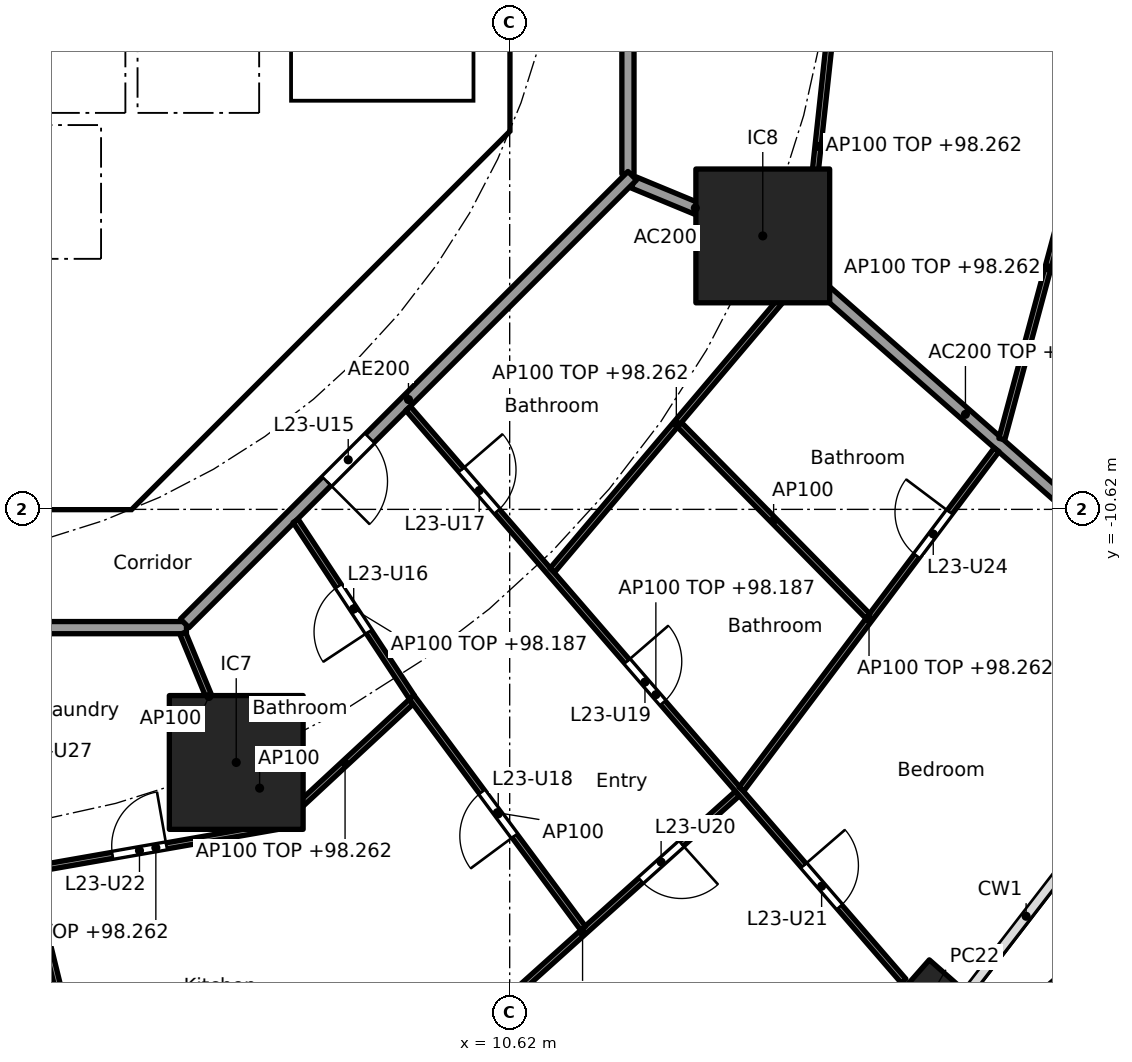
"""IFC4 building model, lengths in metres.
Left out: names, types, materials, properties, quantities, classifications, styles, units other than length and angle.
Written with IfcOpenShell. Run it as: python <this file> out.ifc"""

import sys

from ifc_helpers import new_model, si_unit, direction, frame, frame_2d, origin, origin_2d, place, context, subcontext, project, spatial, polyline, rectangle, hollow_rectangle, outline, extrude, element, fill, save


model = new_model("IFC4")
c1 = context("Model", 3, precision=1e-05, world=origin(), true_north=direction((0.0, 1.0)))
c2 = subcontext(c1, "Body", "Model", "MODEL_VIEW")
j1 = project(units=[si_unit("LENGTHUNIT", "METRE"), si_unit("PLANEANGLEUNIT", "RADIAN")], contexts=[c1])
p1 = place(None, origin())
s1 = spatial("IfcSite", under=j1, at=p1, CompositionType="ELEMENT")
p2 = place(p1, origin())
s2 = spatial("IfcBuilding", under=s1, at=p2, CompositionType="ELEMENT")
p3 = place(p2, frame((0.0, 0.0, 95.5)))
s3 = spatial("IfcBuildingStorey", under=s2, at=p3, CompositionType="ELEMENT", Elevation=95.5)
p4 = place(p3, frame((17.43, -18.813, 0.0), z_axis=(0.0, 0.0, 1.0), x_axis=(0.660114607735, 0.751164898445, 0.0)))
e1 = element("IfcColumn", 1, at=p4, inside=s3, PredefinedType="COLUMN", context=c2, shape_type="SweptSolid", body=[
    extrude(hollow_rectangle(XDim=1.3, YDim=0.9, WallThickness=0.045, at=origin_2d()), origin(), (0.0, 0.0, 1.0), 3.7),
])
for number, where, z_axis, x_axis in (
    (2, (6.123, -14.782, 0.0), (0.0, 0.0, 1.0), (1.0, 0.0, 0.0)),
    (3, (14.782, -6.123, 0.0), (0.0, 0.0, 1.0), (1.0, 0.0, 0.0)),
):
    element("IfcColumn", number, at=place(p3, frame(where, z_axis=z_axis, x_axis=x_axis)), inside=s3, PredefinedType="COLUMN", context=c2, shape_type="SweptSolid", body=[
        extrude(rectangle(XDim=2.2, YDim=2.2, at=origin_2d()), origin(), (0.0, 0.0, 1.0), 3.7),
    ])
p5 = place(p3, frame((4.613, -9.988, 0.0), z_axis=(0.0, 0.0, 1.0), x_axis=(0.707106781187, 0.707106781187, 0.0)))
e4 = element("IfcWall", 4, at=p5, inside=s3, PredefinedType="SHEAR", context=c2, shape_type="SweptSolid", body=[
    extrude(rectangle(XDim=7.602, YDim=0.6, at=frame_2d((3.801, 0.0))), origin(), (0.0, 0.0, 1.0), 3.44),
])
p6 = place(p5, frame((3.201, 0.0, 0.0)))
e5 = element("IfcOpeningElement", 5, at=p6, cuts=e4, PredefinedType="OPENING", context=c2, shape_type="SweptSolid", body=[
    extrude(rectangle(XDim=1.2, YDim=2.1, at=frame_2d((0.6, 1.05))), frame((0.0, 0.31, 0.0), z_axis=(0.0, -1.0, 0.0), x_axis=(1.0, 0.0, 0.0)), (0.0, 0.0, 1.0), 0.62),
])
p7 = place(p3, frame((4.0, -10.025, 0.0), z_axis=(0.0, 0.0, 1.0), x_axis=(0.0, 1.0, 0.0)))
e6 = element("IfcWall", 6, at=p7, inside=s3, PredefinedType="SOLIDWALL", context=c2, shape_type="SweptSolid", body=[
    extrude(rectangle(XDim=3.0, YDim=0.2, at=frame_2d((1.5, 0.0))), origin(), (0.0, 0.0, 1.0), 3.44),
])
p8 = place(p7, frame((0.975, 0.0, 0.0)))
e7 = element("IfcOpeningElement", 7, at=p8, cuts=e6, PredefinedType="OPENING", context=c2, shape_type="SweptSolid", body=[
    extrude(rectangle(XDim=1.1, YDim=2.1, at=frame_2d((0.55, 1.05))), frame((0.0, 0.11, 0.0), z_axis=(0.0, -1.0, 0.0), x_axis=(1.0, 0.0, 0.0)), (0.0, 0.0, 1.0), 0.22),
])
p9 = place(p3, frame((4.0, -6.5, 0.0), z_axis=(0.0, 0.0, 1.0), x_axis=(0.0, 1.0, 0.0)))
e8 = element("IfcWall", 8, at=p9, inside=s3, PredefinedType="SOLIDWALL", context=c2, shape_type="SweptSolid", body=[
    extrude(rectangle(XDim=2.2, YDim=0.2, at=frame_2d((1.1, 0.0))), origin(), (0.0, 0.0, 1.0), 3.44),
])
p10 = place(p9, frame((0.55, 0.0, 0.0)))
e9 = element("IfcOpeningElement", 9, at=p10, cuts=e8, PredefinedType="OPENING", context=c2, shape_type="SweptSolid", body=[
    extrude(rectangle(XDim=1.1, YDim=2.1, at=frame_2d((0.55, 1.05))), frame((0.0, 0.11, 0.0), z_axis=(0.0, -1.0, 0.0), x_axis=(1.0, 0.0, 0.0)), (0.0, 0.0, 1.0), 0.22),
])
p11 = place(p3, origin())
e10 = element("IfcWall", 10, at=p11, inside=s3, PredefinedType="SHEAR", context=c2, shape_type="SweptSolid", body=[
    extrude(outline(polyline([(-4.152, -10.025), (4.152, -10.025), (4.401, -9.776), (4.825, -10.2), (4.401, -10.625), (-4.401, -10.625), (-4.825, -10.2), (-4.401, -9.776), (-4.152, -10.025)])), origin(), (0.0, 0.0, 1.0), 3.44),
])
p12 = place(p3, origin())
e11 = element("IfcWall", 11, at=p12, inside=s3, PredefinedType="SHEAR", context=c2, shape_type="SweptSolid", body=[
    extrude(outline(polyline([(9.776, -4.401), (10.025, -4.152), (10.025, -3.801), (10.025, 4.152), (9.776, 4.401), (10.2, 4.825), (10.625, 4.401), (10.625, -4.401), (10.2, -4.825), (9.776, -4.401)])), origin(), (0.0, 0.0, 1.0), 3.44),
])
p13 = place(p3, origin())
e12 = element("IfcWall", 12, at=p13, inside=s3, PredefinedType="SOLIDWALL", context=c2, shape_type="SweptSolid", body=[
    extrude(outline(polyline([(-6.7, -2.1), (-6.5, -2.1), (-6.5, -4.1), (-4.5, -4.1), (-4.5, -2.1), (-4.3, -2.1), (-4.3, -4.1), (-2.3, -4.1), (-2.3, -2.1), (-2.1, -2.1), (-2.1, -4.1), (-0.1, -4.1), (-0.1, -2.1), (0.1, -2.1), (0.1, -4.1), (2.1, -4.1), (2.1, -2.1), (2.3, -2.1), (2.3, -4.1), (4.3, -4.1), (4.3, -2.1), (4.5, -2.1), (4.5, -4.1), (6.5, -4.1), (6.5, -2.1), (6.7, -2.1), (6.7, -4.3), (-6.7, -4.3), (-6.7, -2.1)])), origin(), (0.0, 0.0, 1.0), 3.44),
])
p14 = place(p3, origin())
e13 = element("IfcWall", 13, at=p14, inside=s3, PredefinedType="SOLIDWALL", context=c2, shape_type="SweptSolid", body=[
    extrude(outline(polyline([(4.1, -7.025), (-4.1, -7.025), (-4.1, -6.5), (4.1, -6.5), (4.1, -7.025)])), origin(), (0.0, 0.0, 1.0), 3.44),
])
p15 = place(p3, origin())
e14 = element("IfcWall", 14, at=p15, inside=s3, PredefinedType="SOLIDWALL", context=c2, shape_type="SweptSolid", body=[
    extrude(outline(polyline([(7.025, -3.9), (6.7, -3.9), (6.7, 3.9), (7.025, 3.9), (7.025, -3.9)])), origin(), (0.0, 0.0, 1.0), 3.44),
])
p16 = place(p3, origin())
e15 = element("IfcWall", 15, at=p16, inside=s3, PredefinedType="SOLIDWALL", context=c2, shape_type="SweptSolid", body=[
    extrude(outline(polyline([(10.025, -4.1), (6.7, -4.1), (6.7, -3.9), (10.025, -3.9), (10.025, -4.1)])), origin(), (0.0, 0.0, 1.0), 3.44),
])
p17 = place(p3, frame((12.657, -5.243, 0.0), z_axis=(0.0, 0.0, 1.0), x_axis=(0.923876145736, -0.382691608661, 0.0)))
e16 = element("IfcWall", 16, at=p17, inside=s3, PredefinedType="PARTITIONING", context=c2, shape_type="SweptSolid", body=[
    extrude(rectangle(XDim=2.2, YDim=0.2, at=frame_2d((1.1, 0.0))), origin(), (0.0, 0.0, 1.0), 3.44),
])
p18 = place(p3, frame((14.82, -6.156, 0.0), z_axis=(0.0, 0.0, 1.0), x_axis=(0.750582231659, -0.660777052808, 0.0)))
e17 = element("IfcWall", 17, at=p18, inside=s3, PredefinedType="PARTITIONING", context=c2, shape_type="SweptSolid", body=[
    extrude(rectangle(XDim=8.781, YDim=0.2, at=frame_2d((4.391, 0.0))), origin(), (0.0, 0.0, 1.0), 2.762),
])
p19 = place(p3, frame((12.565, -5.104, 0.0), z_axis=(0.0, 0.0, 1.0), x_axis=(0.0, 1.0, 0.0)))
e18 = element("IfcWall", 18, at=p19, inside=s3, PredefinedType="PARTITIONING", context=c2, shape_type="SweptSolid", body=[
    extrude(rectangle(XDim=10.209, YDim=0.2, at=frame_2d((5.104, 0.0))), origin(), (0.0, 0.0, 1.0), 3.44),
])
p20 = place(p3, frame((-5.104, -12.565, 0.0), z_axis=(0.0, 0.0, 1.0), x_axis=(1.0, 0.0, 0.0)))
e19 = element("IfcWall", 19, at=p20, inside=s3, PredefinedType="PARTITIONING", context=c2, shape_type="SweptSolid", body=[
    extrude(rectangle(XDim=10.409, YDim=0.2, at=frame_2d((5.205, 0.0))), origin(), (0.0, 0.0, 1.0), 3.44),
])
p21 = place(p3, frame((5.275, -12.494, 0.0), z_axis=(0.0, 0.0, 1.0), x_axis=(0.707106781187, 0.707106781187, 0.0)))
e20 = element("IfcWall", 20, at=p21, inside=s3, PredefinedType="PARTITIONING", context=c2, shape_type="SweptSolid", body=[
    extrude(rectangle(XDim=10.409, YDim=0.2, at=frame_2d((5.205, 0.0))), origin(), (0.0, 0.0, 1.0), 3.44),
])
p22 = place(p21, frame((3.303, 0.0, 0.0)))
e21 = element("IfcOpeningElement", 21, at=p22, cuts=e20, PredefinedType="OPENING", context=c2, shape_type="SweptSolid", body=[
    extrude(rectangle(XDim=1.0, YDim=2.1, at=frame_2d((0.5, 1.05))), frame((0.0, 0.11, 0.0), z_axis=(0.0, -1.0, 0.0), x_axis=(1.0, 0.0, 0.0)), (0.0, 0.0, 1.0), 0.22),
])
p23 = place(p3, frame((1.759, -12.662, 0.0), z_axis=(0.0, 0.0, 1.0), x_axis=(0.239021819854, -0.971014196412, 0.0)))
e22 = element("IfcWall", 22, at=p23, inside=s3, PredefinedType="PARTITIONING", context=c2, shape_type="SweptSolid", body=[
    extrude(rectangle(XDim=14.05, YDim=0.1, at=frame_2d((7.025, 0.0))), origin(), (0.0, 0.0, 1.0), 2.687),
])
p24 = place(p23, frame((6.214, 0.0, 0.0)))
e23 = element("IfcOpeningElement", 23, at=p24, cuts=e22, PredefinedType="OPENING", context=c2, shape_type="SweptSolid", body=[
    extrude(rectangle(XDim=0.9, YDim=2.1, at=frame_2d((0.45, 1.05))), frame((0.0, 0.06, 0.0), z_axis=(0.0, -1.0, 0.0), x_axis=(1.0, 0.0, 0.0)), (0.0, 0.0, 1.0), 0.12),
])
p25 = place(p23, frame((1.552, 0.0, 0.0)))
e24 = element("IfcOpeningElement", 24, at=p25, cuts=e22, PredefinedType="OPENING", context=c2, shape_type="SweptSolid", body=[
    extrude(rectangle(XDim=0.9, YDim=2.1, at=frame_2d((0.45, 1.05))), frame((0.0, 0.06, 0.0), z_axis=(0.0, -1.0, 0.0), x_axis=(1.0, 0.0, 0.0)), (0.0, 0.0, 1.0), 0.12),
])
p26 = place(p3, frame((2.765, -16.541, 0.0), z_axis=(0.0, 0.0, 1.0), x_axis=(0.984998612286, 0.172562260633, 0.0)))
e25 = element("IfcWall", 25, at=p26, inside=s3, PredefinedType="PARTITIONING", context=c2, shape_type="SweptSolid", body=[
    extrude(rectangle(XDim=4.134, YDim=0.1, at=frame_2d((2.067, 0.0))), origin(), (0.0, 0.0, 1.0), 2.762),
])
p27 = place(p26, frame((1.344, 0.0, 0.0)))
e26 = element("IfcOpeningElement", 26, at=p27, cuts=e25, PredefinedType="OPENING", context=c2, shape_type="SweptSolid", body=[
    extrude(rectangle(XDim=0.9, YDim=2.1, at=frame_2d((0.45, 1.05))), frame((0.0, 0.06, 0.0), z_axis=(0.0, -1.0, 0.0), x_axis=(1.0, 0.0, 0.0)), (0.0, 0.0, 1.0), 0.12),
])
p28 = place(p3, frame((5.243, -12.657, 0.0), z_axis=(0.0, 0.0, 1.0), x_axis=(0.382719158442, -0.923864733477, 0.0)))
e27 = element("IfcWall", 27, at=p28, inside=s3, PredefinedType="PARTITIONING", context=c2, shape_type="SweptSolid", body=[
    extrude(rectangle(XDim=2.25, YDim=0.1, at=frame_2d((1.125, 0.0))), origin(), (0.0, 0.0, 1.0), 3.44),
])
p29 = place(p3, frame((6.824, -15.802, 0.0), z_axis=(0.0, 0.0, 1.0), x_axis=(0.733007232109, 0.680220844782, 0.0)))
e28 = element("IfcWall", 28, at=p29, inside=s3, PredefinedType="PARTITIONING", context=c2, shape_type="SweptSolid", body=[
    extrude(rectangle(XDim=2.969, YDim=0.1, at=frame_2d((1.485, 0.0))), origin(), (0.0, 0.0, 1.0), 2.762),
])
p30 = place(p3, frame((9.272, -19.868, 0.0), z_axis=(0.0, 0.0, 1.0), x_axis=(0.743884413566, 0.668308296562, 0.0)))
e29 = element("IfcWall", 29, at=p30, inside=s3, PredefinedType="PARTITIONING", context=c2, shape_type="SweptSolid", body=[
    extrude(rectangle(XDim=6.845, YDim=0.1, at=frame_2d((3.423, 0.0))), origin(), (0.0, 0.0, 1.0), 2.762),
])
p31 = place(p30, frame((4.709, 0.0, 0.0)))
e30 = element("IfcOpeningElement", 30, at=p31, cuts=e29, PredefinedType="OPENING", context=c2, shape_type="SweptSolid", body=[
    extrude(rectangle(XDim=0.9, YDim=2.1, at=frame_2d((0.45, 1.05))), frame((0.0, 0.06, 0.0), z_axis=(0.0, -1.0, 0.0), x_axis=(1.0, 0.0, 0.0)), (0.0, 0.0, 1.0), 0.12),
])
p32 = place(p3, frame((7.1, -10.808, 0.0), z_axis=(0.0, 0.0, 1.0), x_axis=(0.550294419528, -0.834970689208, 0.0)))
e31 = element("IfcWall", 31, at=p32, inside=s3, PredefinedType="PARTITIONING", context=c2, shape_type="SweptSolid", body=[
    extrude(rectangle(XDim=3.472, YDim=0.1, at=frame_2d((1.736, 0.0))), origin(), (0.0, 0.0, 1.0), 2.687),
])
p33 = place(p32, frame((1.286, 0.0, 0.0)))
e32 = element("IfcOpeningElement", 32, at=p33, cuts=e31, PredefinedType="OPENING", context=c2, shape_type="SweptSolid", body=[
    extrude(rectangle(XDim=0.9, YDim=2.1, at=frame_2d((0.45, 1.05))), frame((0.0, 0.06, 0.0), z_axis=(0.0, -1.0, 0.0), x_axis=(1.0, 0.0, 0.0)), (0.0, 0.0, 1.0), 0.12),
])
p34 = place(p3, frame((9.008, -13.708, 0.0), z_axis=(0.0, 0.0, 1.0), x_axis=(0.595845850207, -0.803098825047, 0.0)))
e33 = element("IfcWall", 33, at=p34, inside=s3, PredefinedType="PARTITIONING", context=c2, shape_type="SweptSolid", body=[
    extrude(rectangle(XDim=4.729, YDim=0.1, at=frame_2d((2.365, 0.0))), origin(), (0.0, 0.0, 1.0), 3.44),
])
p35 = place(p34, frame((1.94, 0.0, 0.0)))
e34 = element("IfcOpeningElement", 34, at=p35, cuts=e33, PredefinedType="OPENING", context=c2, shape_type="SweptSolid", body=[
    extrude(rectangle(XDim=0.9, YDim=2.1, at=frame_2d((0.45, 1.05))), frame((0.0, 0.06, 0.0), z_axis=(0.0, -1.0, 0.0), x_axis=(1.0, 0.0, 0.0)), (0.0, 0.0, 1.0), 0.12),
])
p36 = place(p3, frame((8.95, -8.96, 0.0), z_axis=(0.0, 0.0, 1.0), x_axis=(0.65441081073, -0.756139200676, 0.0)))
e35 = element("IfcWall", 35, at=p36, inside=s3, PredefinedType="PARTITIONING", context=c2, shape_type="SweptSolid", body=[
    extrude(rectangle(XDim=12.451, YDim=0.1, at=frame_2d((6.226, 0.0))), origin(), (0.0, 0.0, 1.0), 2.687),
])
p37 = place(p36, frame((1.336, 0.0, 0.0)))
e36 = element("IfcOpeningElement", 36, at=p37, cuts=e35, PredefinedType="OPENING", context=c2, shape_type="SweptSolid", body=[
    extrude(rectangle(XDim=0.9, YDim=2.1, at=frame_2d((0.45, 1.05))), frame((0.0, 0.06, 0.0), z_axis=(0.0, -1.0, 0.0), x_axis=(1.0, 0.0, 0.0)), (0.0, 0.0, 1.0), 0.12),
])
p38 = place(p36, frame((5.501, 0.0, 0.0)))
e37 = element("IfcOpeningElement", 37, at=p38, cuts=e35, PredefinedType="OPENING", context=c2, shape_type="SweptSolid", body=[
    extrude(rectangle(XDim=0.9, YDim=2.1, at=frame_2d((0.45, 1.05))), frame((0.0, 0.06, 0.0), z_axis=(0.0, -1.0, 0.0), x_axis=(1.0, 0.0, 0.0)), (0.0, 0.0, 1.0), 0.12),
])
p39 = place(p36, frame((9.941, 0.0, 0.0)))
e38 = element("IfcOpeningElement", 38, at=p39, cuts=e35, PredefinedType="OPENING", context=c2, shape_type="SweptSolid", body=[
    extrude(rectangle(XDim=0.9, YDim=2.1, at=frame_2d((0.45, 1.05))), frame((0.0, 0.06, 0.0), z_axis=(0.0, -1.0, 0.0), x_axis=(1.0, 0.0, 0.0)), (0.0, 0.0, 1.0), 0.12),
])
p40 = place(p3, frame((11.32, -11.623, 0.0), z_axis=(0.0, 0.0, 1.0), x_axis=(0.646106810963, 0.763247003811, 0.0)))
e39 = element("IfcWall", 39, at=p40, inside=s3, PredefinedType="PARTITIONING", context=c2, shape_type="SweptSolid", body=[
    extrude(rectangle(XDim=6.317, YDim=0.1, at=frame_2d((3.159, 0.0))), origin(), (0.0, 0.0, 1.0), 2.762),
])
p41 = place(p3, frame((14.432, -15.219, 0.0), z_axis=(0.0, 0.0, 1.0), x_axis=(0.601001256685, 0.799248077548, 0.0)))
e40 = element("IfcWall", 40, at=p41, inside=s3, PredefinedType="PARTITIONING", context=c2, shape_type="SweptSolid", body=[
    extrude(rectangle(XDim=6.98, YDim=0.1, at=frame_2d((3.49, 0.0))), origin(), (0.0, 0.0, 1.0), 2.762),
])
p42 = place(p41, frame((4.798, 0.0, 0.0)))
e41 = element("IfcOpeningElement", 41, at=p42, cuts=e40, PredefinedType="OPENING", context=c2, shape_type="SweptSolid", body=[
    extrude(rectangle(XDim=0.9, YDim=2.1, at=frame_2d((0.45, 1.05))), frame((0.0, 0.06, 0.0), z_axis=(0.0, -1.0, 0.0), x_axis=(1.0, 0.0, 0.0)), (0.0, 0.0, 1.0), 0.12),
])
p43 = place(p3, frame((13.412, -9.229, 0.0), z_axis=(0.0, 0.0, 1.0), x_axis=(0.701611164285, -0.712560014421, 0.0)))
e42 = element("IfcWall", 42, at=p43, inside=s3, PredefinedType="PARTITIONING", context=c2, shape_type="SweptSolid", body=[
    extrude(rectangle(XDim=4.415, YDim=0.1, at=frame_2d((2.208, 0.0))), origin(), (0.0, 0.0, 1.0), 3.44),
])
p44 = place(p3, frame((15.477, -6.625, 0.0), z_axis=(0.0, 0.0, 1.0), x_axis=(0.107570517496, 0.994197457131, 0.0)))
e43 = element("IfcWall", 43, at=p44, inside=s3, PredefinedType="PARTITIONING", context=c2, shape_type="SweptSolid", body=[
    extrude(rectangle(XDim=3.972, YDim=0.1, at=frame_2d((1.986, 0.0))), origin(), (0.0, 0.0, 1.0), 2.762),
])
p45 = place(p3, frame((18.713, -9.464, 0.0), z_axis=(0.0, 0.0, 1.0), x_axis=(0.260279646259, 0.965533275316, 0.0)))
e44 = element("IfcWall", 44, at=p45, inside=s3, PredefinedType="PARTITIONING", context=c2, shape_type="SweptSolid", body=[
    extrude(rectangle(XDim=5.833, YDim=0.1, at=frame_2d((2.917, 0.0))), origin(), (0.0, 0.0, 1.0), 2.762),
])
p46 = place(p3, frame((6.781, -15.638, 0.0), z_axis=(0.0, 0.0, 1.0), x_axis=(-0.533419461524, 0.845850860417, 0.0)))
e45 = element("IfcWall", 45, at=p46, inside=s3, PredefinedType="PARTITIONING", context=c2, shape_type="SweptSolid", body=[
    extrude(rectangle(XDim=1.025, YDim=0.1, at=frame_2d((0.513, 0.0))), origin(), (0.0, 0.0, 1.0), 3.44),
])
p47 = place(p10, origin())
e46 = element("IfcDoor", 46, at=p47, inside=s3, OperationType="DOUBLE_DOOR_SLIDING", PredefinedType="DOOR", context=c2, shape_type="SweptSolid", body=[
    extrude(rectangle(XDim=1.1, YDim=2.1, at=frame_2d((0.55, 1.05))), frame((0.0, 0.025, 0.0), z_axis=(0.0, -1.0, 0.0), x_axis=(1.0, 0.0, 0.0)), (0.0, 0.0, 1.0), 0.05),
])
fill(e9, e46)
p48 = place(p8, origin())
e47 = element("IfcDoor", 47, at=p48, inside=s3, OperationType="SINGLE_SWING_LEFT", PredefinedType="DOOR", context=c2, shape_type="SweptSolid", body=[
    extrude(rectangle(XDim=1.1, YDim=2.1, at=frame_2d((0.55, 1.05))), frame((0.0, 0.025, 0.0), z_axis=(0.0, -1.0, 0.0), x_axis=(1.0, 0.0, 0.0)), (0.0, 0.0, 1.0), 0.05),
])
fill(e7, e47)
p49 = place(p6, origin())
e48 = element("IfcDoor", 48, at=p49, inside=s3, OperationType="SINGLE_SWING_RIGHT", PredefinedType="DOOR", context=c2, shape_type="SweptSolid", body=[
    extrude(rectangle(XDim=1.2, YDim=2.1, at=frame_2d((0.6, 1.05))), frame((0.0, 0.025, 0.0), z_axis=(0.0, -1.0, 0.0), x_axis=(1.0, 0.0, 0.0)), (0.0, 0.0, 1.0), 0.05),
])
fill(e5, e48)
p50 = place(p22, frame((1.0, 0.0, 0.0), x_axis=(-1.0, 0.0, 0.0)))
e49 = element("IfcDoor", 49, at=p50, inside=s3, OperationType="SINGLE_SWING_RIGHT", PredefinedType="DOOR", context=c2, shape_type="SweptSolid", body=[
    extrude(rectangle(XDim=1.0, YDim=2.1, at=frame_2d((0.5, 1.05))), frame((0.0, 0.025, 0.0), z_axis=(0.0, -1.0, 0.0), x_axis=(1.0, 0.0, 0.0)), (0.0, 0.0, 1.0), 0.05),
])
fill(e21, e49)
p51 = place(p33, frame((0.9, 0.0, 0.0), x_axis=(-1.0, 0.0, 0.0)))
e50 = element("IfcDoor", 50, at=p51, inside=s3, OperationType="SINGLE_SWING_LEFT", PredefinedType="DOOR", context=c2, shape_type="SweptSolid", body=[
    extrude(rectangle(XDim=0.9, YDim=2.1, at=frame_2d((0.45, 1.05))), frame((0.0, 0.025, 0.0), z_axis=(0.0, -1.0, 0.0), x_axis=(1.0, 0.0, 0.0)), (0.0, 0.0, 1.0), 0.05),
])
fill(e32, e50)
p52 = place(p37, origin())
e51 = element("IfcDoor", 51, at=p52, inside=s3, OperationType="SINGLE_SWING_LEFT", PredefinedType="DOOR", context=c2, shape_type="SweptSolid", body=[
    extrude(rectangle(XDim=0.9, YDim=2.1, at=frame_2d((0.45, 1.05))), frame((0.0, 0.025, 0.0), z_axis=(0.0, -1.0, 0.0), x_axis=(1.0, 0.0, 0.0)), (0.0, 0.0, 1.0), 0.05),
])
fill(e36, e51)
p53 = place(p35, frame((0.9, 0.0, 0.0), x_axis=(-1.0, 0.0, 0.0)))
e52 = element("IfcDoor", 52, at=p53, inside=s3, OperationType="SINGLE_SWING_LEFT", PredefinedType="DOOR", context=c2, shape_type="SweptSolid", body=[
    extrude(rectangle(XDim=0.9, YDim=2.1, at=frame_2d((0.45, 1.05))), frame((0.0, 0.025, 0.0), z_axis=(0.0, -1.0, 0.0), x_axis=(1.0, 0.0, 0.0)), (0.0, 0.0, 1.0), 0.05),
])
fill(e34, e52)
p54 = place(p38, origin())
e53 = element("IfcDoor", 53, at=p54, inside=s3, OperationType="SINGLE_SWING_LEFT", PredefinedType="DOOR", context=c2, shape_type="SweptSolid", body=[
    extrude(rectangle(XDim=0.9, YDim=2.1, at=frame_2d((0.45, 1.05))), frame((0.0, 0.025, 0.0), z_axis=(0.0, -1.0, 0.0), x_axis=(1.0, 0.0, 0.0)), (0.0, 0.0, 1.0), 0.05),
])
fill(e37, e53)
p55 = place(p31, frame((0.9, 0.0, 0.0), x_axis=(-1.0, 0.0, 0.0)))
e54 = element("IfcDoor", 54, at=p55, inside=s3, OperationType="SINGLE_SWING_LEFT", PredefinedType="DOOR", context=c2, shape_type="SweptSolid", body=[
    extrude(rectangle(XDim=0.9, YDim=2.1, at=frame_2d((0.45, 1.05))), frame((0.0, 0.025, 0.0), z_axis=(0.0, -1.0, 0.0), x_axis=(1.0, 0.0, 0.0)), (0.0, 0.0, 1.0), 0.05),
])
fill(e30, e54)
p56 = place(p39, origin())
e55 = element("IfcDoor", 55, at=p56, inside=s3, OperationType="SINGLE_SWING_LEFT", PredefinedType="DOOR", context=c2, shape_type="SweptSolid", body=[
    extrude(rectangle(XDim=0.9, YDim=2.1, at=frame_2d((0.45, 1.05))), frame((0.0, 0.025, 0.0), z_axis=(0.0, -1.0, 0.0), x_axis=(1.0, 0.0, 0.0)), (0.0, 0.0, 1.0), 0.05),
])
fill(e38, e55)
p57 = place(p27, origin())
e56 = element("IfcDoor", 56, at=p57, inside=s3, OperationType="SINGLE_SWING_RIGHT", PredefinedType="DOOR", context=c2, shape_type="SweptSolid", body=[
    extrude(rectangle(XDim=0.9, YDim=2.1, at=frame_2d((0.45, 1.05))), frame((0.0, 0.025, 0.0), z_axis=(0.0, -1.0, 0.0), x_axis=(1.0, 0.0, 0.0)), (0.0, 0.0, 1.0), 0.05),
])
fill(e26, e56)
p58 = place(p42, origin())
e57 = element("IfcDoor", 57, at=p58, inside=s3, OperationType="SINGLE_SWING_RIGHT", PredefinedType="DOOR", context=c2, shape_type="SweptSolid", body=[
    extrude(rectangle(XDim=0.9, YDim=2.1, at=frame_2d((0.45, 1.05))), frame((0.0, 0.025, 0.0), z_axis=(0.0, -1.0, 0.0), x_axis=(1.0, 0.0, 0.0)), (0.0, 0.0, 1.0), 0.05),
])
fill(e41, e57)
save(model, sys.argv[1])
